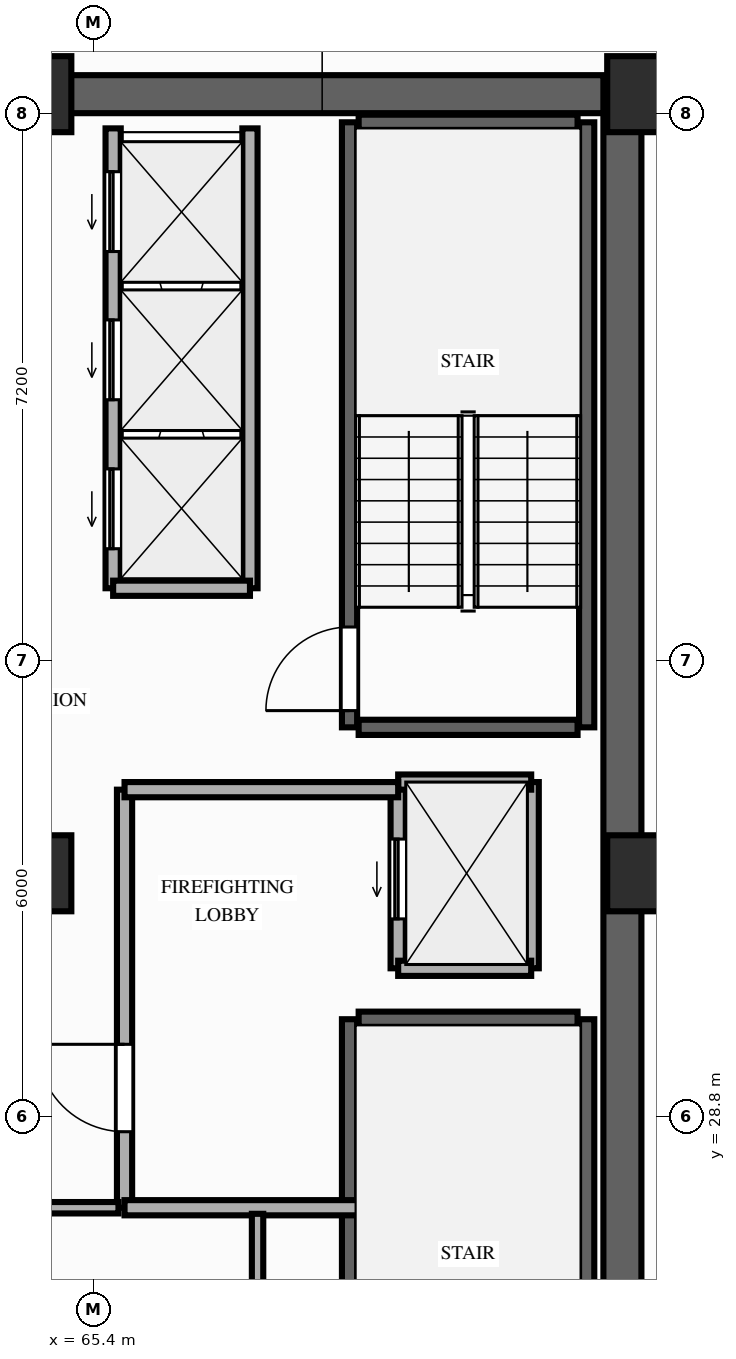
"""IFC4 building model, lengths in metres.
Left out: names, types, materials, properties, quantities, classifications, styles, units other than length and angle.
Written with IfcOpenShell. Run it as: python <this file> out.ifc"""

import sys

from ifc_helpers import new_model, si_unit, direction, frame, frame_2d, origin, origin_2d, place, context, subcontext, project, spatial, rectangle, extrude, element, fill, save


model = new_model("IFC4")
c1 = context("Model", 3, precision=1e-05, world=origin(), true_north=direction((0.0, 1.0)))
c2 = subcontext(c1, "Body", "Model", "MODEL_VIEW")
j1 = project(units=[si_unit("LENGTHUNIT", "METRE"), si_unit("PLANEANGLEUNIT", "RADIAN")], contexts=[c1])
p1 = place(None, origin())
s1 = spatial("IfcSite", under=j1, at=p1, CompositionType="ELEMENT")
p2 = place(p1, origin())
s2 = spatial("IfcBuilding", under=s1, at=p2, CompositionType="ELEMENT")
p3 = place(p2, frame((0.0, 0.0, 59.6)))
s3 = spatial("IfcBuildingStorey", under=s2, at=p3, CompositionType="ELEMENT", Elevation=59.6)
for number, where, z_axis, x_axis in (
    (1, (64.6, 32.0, 0.0), (0.0, 0.0, 1.0), (1.0, 0.0, 0.0)),
    (2, (72.65, 32.0, 0.0), (0.0, 0.0, 1.0), (1.0, 0.0, 0.0)),
    (3, (64.6, 42.25, 0.0), (0.0, 0.0, 1.0), (1.0, 0.0, 0.0)),
    (4, (72.65, 42.25, 0.0), (0.0, 0.0, 1.0), (1.0, 0.0, 0.0)),
):
    element("IfcColumn", number, at=place(p3, frame(where, z_axis=z_axis, x_axis=x_axis)), inside=s3, PredefinedType="COLUMN", context=c2, shape_type="SweptSolid", body=[
        extrude(rectangle(XDim=1.0, YDim=1.0, at=origin_2d()), origin(), (0.0, 0.0, 1.0), 3.2),
    ])
p4 = place(p3, frame((72.35, 22.0, 0.0), z_axis=(0.0, 0.0, 1.0), x_axis=(0.0, 1.0, 0.0)))
e5 = element("IfcWall", 5, at=p4, inside=s3, PredefinedType="SHEAR", context=c2, shape_type="SweptSolid", body=[
    extrude(rectangle(XDim=20.25, YDim=0.5, at=frame_2d((10.125, 0.0))), origin(), (0.0, 0.0, 1.0), 3.02),
])
p5 = place(p3, frame((64.6, 42.25, 0.0), z_axis=(0.0, 0.0, 1.0), x_axis=(1.0, 0.0, 0.0)))
e6 = element("IfcWall", 6, at=p5, inside=s3, PredefinedType="SHEAR", context=c2, shape_type="SweptSolid", body=[
    extrude(rectangle(XDim=7.5, YDim=0.5, at=frame_2d((3.75, 0.0))), origin(), (0.0, 0.0, 1.0), 3.02),
])
p6 = place(p3, frame((68.76, 22.26, 0.0), z_axis=(0.0, 0.0, 1.0), x_axis=(0.0, 1.0, 0.0)))
e7 = element("IfcWall", 7, at=p6, inside=s3, PredefinedType="SHEAR", context=c2, shape_type="SweptSolid", body=[
    extrude(rectangle(XDim=7.82, YDim=0.2, at=frame_2d((3.91, 0.0))), origin(), (0.0, 0.0, 1.0), 3.02),
])
p7 = place(p6, frame((0.22, 0.0, 0.0)))
e8 = element("IfcOpeningElement", 8, at=p7, cuts=e7, PredefinedType="OPENING", context=c2, shape_type="SweptSolid", body=[
    extrude(rectangle(XDim=1.1, YDim=2.15, at=frame_2d((0.55, 1.075))), frame((0.0, 0.11, 0.0), z_axis=(0.0, -1.0, 0.0), x_axis=(1.0, 0.0, 0.0)), (0.0, 0.0, 1.0), 0.22),
])
p8 = place(p3, frame((71.88, 22.26, 0.0), z_axis=(0.0, 0.0, 1.0), x_axis=(0.0, 1.0, 0.0)))
e9 = element("IfcWall", 9, at=p8, inside=s3, PredefinedType="SHEAR", context=c2, shape_type="SweptSolid", body=[
    extrude(rectangle(XDim=7.82, YDim=0.2, at=frame_2d((3.91, 0.0))), origin(), (0.0, 0.0, 1.0), 3.02),
])
p9 = place(p3, frame((68.88, 30.08, 0.0), z_axis=(0.0, 0.0, 1.0), x_axis=(1.0, 0.0, 0.0)))
e10 = element("IfcWall", 10, at=p9, inside=s3, PredefinedType="SHEAR", context=c2, shape_type="SweptSolid", body=[
    extrude(rectangle(XDim=2.88, YDim=0.2, at=frame_2d((1.44, 0.0))), origin(), (0.0, 0.0, 1.0), 3.02),
])
p10 = place(p3, frame((68.76, 33.92, 0.0), z_axis=(0.0, 0.0, 1.0), x_axis=(0.0, 1.0, 0.0)))
e11 = element("IfcWall", 11, at=p10, inside=s3, PredefinedType="SHEAR", context=c2, shape_type="SweptSolid", body=[
    extrude(rectangle(XDim=7.96, YDim=0.2, at=frame_2d((3.98, 0.0))), origin(), (0.0, 0.0, 1.0), 3.02),
])
p11 = place(p10, frame((0.22, 0.0, 0.0)))
e12 = element("IfcOpeningElement", 12, at=p11, cuts=e11, PredefinedType="OPENING", context=c2, shape_type="SweptSolid", body=[
    extrude(rectangle(XDim=1.1, YDim=2.15, at=frame_2d((0.55, 1.075))), frame((0.0, 0.11, 0.0), z_axis=(0.0, -1.0, 0.0), x_axis=(1.0, 0.0, 0.0)), (0.0, 0.0, 1.0), 0.22),
])
p12 = place(p3, frame((71.88, 33.92, 0.0), z_axis=(0.0, 0.0, 1.0), x_axis=(0.0, 1.0, 0.0)))
e13 = element("IfcWall", 13, at=p12, inside=s3, PredefinedType="SHEAR", context=c2, shape_type="SweptSolid", body=[
    extrude(rectangle(XDim=7.96, YDim=0.2, at=frame_2d((3.98, 0.0))), origin(), (0.0, 0.0, 1.0), 3.02),
])
for number, where, z_axis, x_axis in (
    (14, (68.88, 41.88, 0.0), (0.0, 0.0, 1.0), (1.0, 0.0, 0.0)),
    (15, (68.88, 33.92, 0.0), (0.0, 0.0, 1.0), (1.0, 0.0, 0.0)),
):
    element("IfcWall", number, at=place(p3, frame(where, z_axis=z_axis, x_axis=x_axis)), inside=s3, PredefinedType="SHEAR", context=c2, shape_type="SweptSolid", body=[
        extrude(rectangle(XDim=2.88, YDim=0.2, at=frame_2d((1.44, 0.0))), origin(), (0.0, 0.0, 1.0), 3.02),
    ])
p13 = place(p3, frame((65.65, 35.75, 0.0), z_axis=(0.0, 0.0, 1.0), x_axis=(0.0, 1.0, 0.0)))
e16 = element("IfcWall", 16, at=p13, inside=s3, PredefinedType="MOVABLE", context=c2, shape_type="SweptSolid", body=[
    extrude(rectangle(XDim=6.05, YDim=0.2, at=frame_2d((3.025, 0.0))), origin(), (0.0, 0.0, 1.0), 3.02),
])
p14 = place(p13, frame((0.52, 0.0, 0.0)))
e17 = element("IfcOpeningElement", 17, at=p14, cuts=e16, PredefinedType="OPENING", context=c2, shape_type="SweptSolid", body=[
    extrude(rectangle(XDim=1.05, YDim=2.15, at=frame_2d((0.525, 1.075))), frame((0.0, 0.11, 0.0), z_axis=(0.0, -1.0, 0.0), x_axis=(1.0, 0.0, 0.0)), (0.0, 0.0, 1.0), 0.22),
])
p15 = place(p13, frame((2.48, 0.0, 0.0)))
e18 = element("IfcOpeningElement", 18, at=p15, cuts=e16, PredefinedType="OPENING", context=c2, shape_type="SweptSolid", body=[
    extrude(rectangle(XDim=1.05, YDim=2.15, at=frame_2d((0.525, 1.075))), frame((0.0, 0.11, 0.0), z_axis=(0.0, -1.0, 0.0), x_axis=(1.0, 0.0, 0.0)), (0.0, 0.0, 1.0), 0.22),
])
p16 = place(p13, frame((4.43, 0.0, 0.0)))
e19 = element("IfcOpeningElement", 19, at=p16, cuts=e16, PredefinedType="OPENING", context=c2, shape_type="SweptSolid", body=[
    extrude(rectangle(XDim=1.05, YDim=2.15, at=frame_2d((0.525, 1.075))), frame((0.0, 0.11, 0.0), z_axis=(0.0, -1.0, 0.0), x_axis=(1.0, 0.0, 0.0)), (0.0, 0.0, 1.0), 0.22),
])
p17 = place(p3, frame((67.45, 35.75, 0.0), z_axis=(0.0, 0.0, 1.0), x_axis=(0.0, 1.0, 0.0)))
e20 = element("IfcWall", 20, at=p17, inside=s3, PredefinedType="MOVABLE", context=c2, shape_type="SweptSolid", body=[
    extrude(rectangle(XDim=6.05, YDim=0.2, at=frame_2d((3.025, 0.0))), origin(), (0.0, 0.0, 1.0), 3.02),
])
p18 = place(p3, frame((65.65, 35.75, 0.0), z_axis=(0.0, 0.0, 1.0), x_axis=(1.0, 0.0, 0.0)))
e21 = element("IfcWall", 21, at=p18, inside=s3, PredefinedType="MOVABLE", context=c2, shape_type="SweptSolid", body=[
    extrude(rectangle(XDim=1.8, YDim=0.2, at=frame_2d((0.9, 0.0))), origin(), (0.0, 0.0, 1.0), 3.02),
])
p19 = place(p3, frame((69.4, 30.75, 0.0), z_axis=(0.0, 0.0, 1.0), x_axis=(0.0, 1.0, 0.0)))
e22 = element("IfcWall", 22, at=p19, inside=s3, PredefinedType="MOVABLE", context=c2, shape_type="SweptSolid", body=[
    extrude(rectangle(XDim=2.45, YDim=0.2, at=frame_2d((1.225, 0.0))), origin(), (0.0, 0.0, 1.0), 3.02),
])
p20 = place(p19, frame((0.65, 0.0, 0.0)))
e23 = element("IfcOpeningElement", 23, at=p20, cuts=e22, PredefinedType="OPENING", context=c2, shape_type="SweptSolid", body=[
    extrude(rectangle(XDim=1.05, YDim=2.15, at=frame_2d((0.525, 1.075))), frame((0.0, 0.11, 0.0), z_axis=(0.0, -1.0, 0.0), x_axis=(1.0, 0.0, 0.0)), (0.0, 0.0, 1.0), 0.22),
])
p21 = place(p3, frame((71.15, 30.75, 0.0), z_axis=(0.0, 0.0, 1.0), x_axis=(0.0, 1.0, 0.0)))
e24 = element("IfcWall", 24, at=p21, inside=s3, PredefinedType="MOVABLE", context=c2, shape_type="SweptSolid", body=[
    extrude(rectangle(XDim=2.45, YDim=0.2, at=frame_2d((1.225, 0.0))), origin(), (0.0, 0.0, 1.0), 3.02),
])
for number, where, z_axis, x_axis in (
    (25, (69.4, 33.2, 0.0), (0.0, 0.0, 1.0), (1.0, 0.0, 0.0)),
    (26, (69.4, 30.75, 0.0), (0.0, 0.0, 1.0), (1.0, 0.0, 0.0)),
):
    element("IfcWall", number, at=place(p3, frame(where, z_axis=z_axis, x_axis=x_axis)), inside=s3, PredefinedType="MOVABLE", context=c2, shape_type="SweptSolid", body=[
        extrude(rectangle(XDim=1.75, YDim=0.2, at=frame_2d((0.875, 0.0))), origin(), (0.0, 0.0, 1.0), 3.02),
    ])
p22 = place(p3, frame((65.8, 27.6, 0.0), z_axis=(0.0, 0.0, 1.0), x_axis=(0.0, 1.0, 0.0)))
e27 = element("IfcWall", 27, at=p22, inside=s3, PredefinedType="PARTITIONING", context=c2, shape_type="SweptSolid", body=[
    extrude(rectangle(XDim=5.5, YDim=0.2, at=frame_2d((2.75, 0.0))), origin(), (0.0, 0.0, 1.0), 3.02),
])
p23 = place(p22, frame((1.0, 0.0, 0.0)))
e28 = element("IfcOpeningElement", 28, at=p23, cuts=e27, PredefinedType="OPENING", context=c2, shape_type="SweptSolid", body=[
    extrude(rectangle(XDim=1.15, YDim=2.15, at=frame_2d((0.575, 1.075))), frame((0.0, 0.11, 0.0), z_axis=(0.0, -1.0, 0.0), x_axis=(1.0, 0.0, 0.0)), (0.0, 0.0, 1.0), 0.22),
])
p24 = place(p3, frame((65.8, 33.1, 0.0), z_axis=(0.0, 0.0, 1.0), x_axis=(1.0, 0.0, 0.0)))
e29 = element("IfcWall", 29, at=p24, inside=s3, PredefinedType="PARTITIONING", context=c2, shape_type="SweptSolid", body=[
    extrude(rectangle(XDim=3.6, YDim=0.2, at=frame_2d((1.8, 0.0))), origin(), (0.0, 0.0, 1.0), 3.02),
])
p25 = place(p3, frame((65.8, 27.6, 0.0), z_axis=(0.0, 0.0, 1.0), x_axis=(1.0, 0.0, 0.0)))
e30 = element("IfcWall", 30, at=p25, inside=s3, PredefinedType="PARTITIONING", context=c2, shape_type="SweptSolid", body=[
    extrude(rectangle(XDim=3.4, YDim=0.2, at=frame_2d((1.7, 0.0))), origin(), (0.0, 0.0, 1.0), 3.02),
])
p26 = place(p3, frame((67.55, 21.05, 0.0), z_axis=(0.0, 0.0, 1.0), x_axis=(0.0, 1.0, 0.0)))
e31 = element("IfcWall", 31, at=p26, inside=s3, PredefinedType="PARTITIONING", context=c2, shape_type="SweptSolid", body=[
    extrude(rectangle(XDim=6.47, YDim=0.15, at=frame_2d((3.235, 0.0))), origin(), (0.0, 0.0, 1.0), 2.5),
])
p27 = place(p3, frame((64.25, 27.6, 0.0), z_axis=(0.0, 0.0, 1.0), x_axis=(1.0, 0.0, 0.0)))
e32 = element("IfcWall", 32, at=p27, inside=s3, PredefinedType="PARTITIONING", context=c2, shape_type="SweptSolid", body=[
    extrude(rectangle(XDim=1.47, YDim=0.15, at=frame_2d((0.735, 0.0))), origin(), (0.0, 0.0, 1.0), 2.5),
])
p28 = place(p11, origin())
e33 = element("IfcDoor", 33, at=p28, inside=s3, OperationType="SINGLE_SWING_LEFT", PredefinedType="DOOR", context=c2, shape_type="SweptSolid", body=[
    extrude(rectangle(XDim=1.1, YDim=2.15, at=frame_2d((0.55, 1.075))), frame((0.0, 0.025, 0.0), z_axis=(0.0, -1.0, 0.0), x_axis=(1.0, 0.0, 0.0)), (0.0, 0.0, 1.0), 0.05),
])
fill(e12, e33)
p29 = place(p14, origin())
e34 = element("IfcDoor", 34, at=p29, inside=s3, OperationType="SLIDING_TO_LEFT", PredefinedType="DOOR", context=c2, shape_type="SweptSolid", body=[
    extrude(rectangle(XDim=1.05, YDim=2.15, at=frame_2d((0.525, 1.075))), frame((0.0, 0.025, 0.0), z_axis=(0.0, -1.0, 0.0), x_axis=(1.0, 0.0, 0.0)), (0.0, 0.0, 1.0), 0.05),
])
fill(e17, e34)
p30 = place(p15, origin())
e35 = element("IfcDoor", 35, at=p30, inside=s3, OperationType="SLIDING_TO_LEFT", PredefinedType="DOOR", context=c2, shape_type="SweptSolid", body=[
    extrude(rectangle(XDim=1.05, YDim=2.15, at=frame_2d((0.525, 1.075))), frame((0.0, 0.025, 0.0), z_axis=(0.0, -1.0, 0.0), x_axis=(1.0, 0.0, 0.0)), (0.0, 0.0, 1.0), 0.05),
])
fill(e18, e35)
p31 = place(p16, origin())
e36 = element("IfcDoor", 36, at=p31, inside=s3, OperationType="SLIDING_TO_LEFT", PredefinedType="DOOR", context=c2, shape_type="SweptSolid", body=[
    extrude(rectangle(XDim=1.05, YDim=2.15, at=frame_2d((0.525, 1.075))), frame((0.0, 0.025, 0.0), z_axis=(0.0, -1.0, 0.0), x_axis=(1.0, 0.0, 0.0)), (0.0, 0.0, 1.0), 0.05),
])
fill(e19, e36)
p32 = place(p20, origin())
e37 = element("IfcDoor", 37, at=p32, inside=s3, OperationType="SLIDING_TO_LEFT", PredefinedType="DOOR", context=c2, shape_type="SweptSolid", body=[
    extrude(rectangle(XDim=1.05, YDim=2.15, at=frame_2d((0.525, 1.075))), frame((0.0, 0.025, 0.0), z_axis=(0.0, -1.0, 0.0), x_axis=(1.0, 0.0, 0.0)), (0.0, 0.0, 1.0), 0.05),
])
fill(e23, e37)
p33 = place(p23, origin())
e38 = element("IfcDoor", 38, at=p33, inside=s3, OperationType="SINGLE_SWING_RIGHT", PredefinedType="DOOR", context=c2, shape_type="SweptSolid", body=[
    extrude(rectangle(XDim=1.15, YDim=2.15, at=frame_2d((0.575, 1.075))), frame((0.0, 0.025, 0.0), z_axis=(0.0, -1.0, 0.0), x_axis=(1.0, 0.0, 0.0)), (0.0, 0.0, 1.0), 0.05),
])
fill(e28, e38)
save(model, sys.argv[1])
